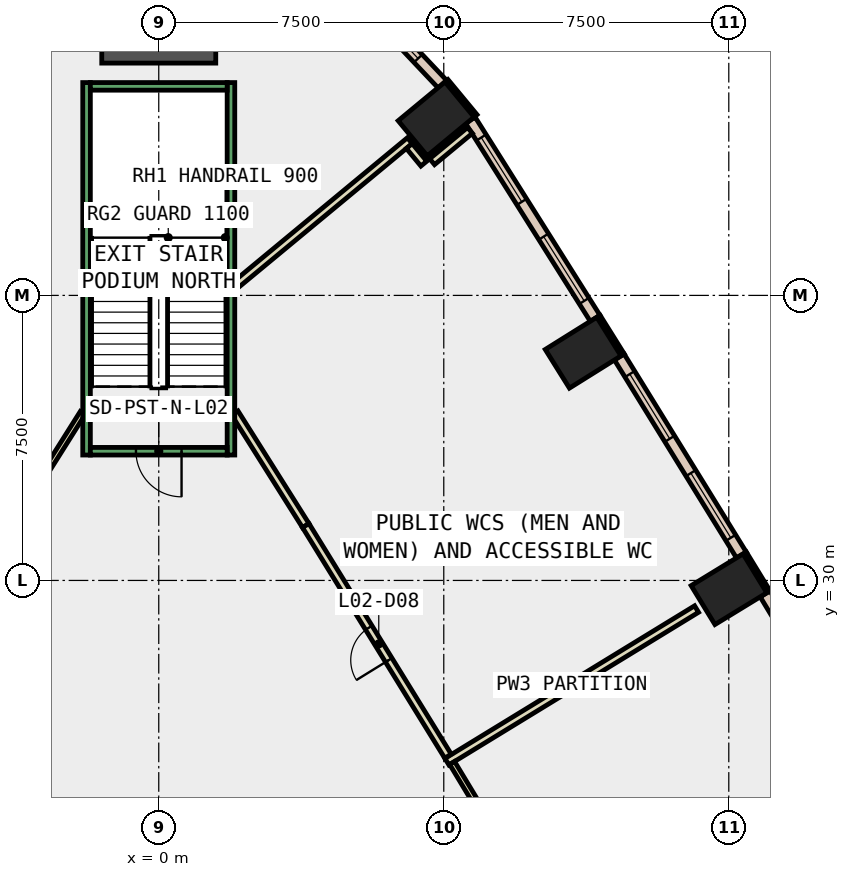
"""IFC4 building model, lengths in metres.
Left out: names, types, materials, properties, quantities, classifications, styles, units other than length and angle.
Written with IfcOpenShell. Run it as: python <this file> out.ifc"""

import sys

from ifc_helpers import new_model, si_unit, direction, frame, frame_2d, origin, origin_2d, place, context, subcontext, project, spatial, rectangle, extrude, element, fill, save


model = new_model("IFC4")
c1 = context("Model", 3, precision=1e-05, world=origin(), true_north=direction((0.0, 1.0)))
c2 = subcontext(c1, "Body", "Model", "MODEL_VIEW")
j1 = project(units=[si_unit("LENGTHUNIT", "METRE"), si_unit("PLANEANGLEUNIT", "RADIAN")], contexts=[c1])
p1 = place(None, origin())
s1 = spatial("IfcSite", under=j1, at=p1, CompositionType="ELEMENT")
p2 = place(p1, origin())
s2 = spatial("IfcBuilding", under=s1, at=p2, CompositionType="ELEMENT")
p3 = place(p2, frame((0.0, 0.0, 15.0)))
s3 = spatial("IfcBuildingStorey", under=s2, at=p3, CompositionType="ELEMENT", Elevation=15.0)
for number, where, z_axis, x_axis in (
    (1, (15.005, 29.769, -0.45), (0.0, 0.0, 1.0), (-0.522, 0.853, 0.0)),
    (2, (11.167, 35.993, -0.45), (0.0, 0.0, 1.0), (-0.53, 0.848, 0.0)),
    (3, (7.299, 42.144, -0.45), (0.0, 0.0, 1.0), (-0.638, 0.77, 0.0)),
):
    element("IfcColumn", number, at=place(p3, frame(where, z_axis=z_axis, x_axis=x_axis)), inside=s3, PredefinedType="COLUMN", context=c2, shape_type="SweptSolid", body=[
        extrude(rectangle(XDim=1.2, YDim=1.6, at=origin_2d()), origin(), (0.0, 0.0, 1.0), 5.0),
    ])
p4 = place(p3, frame((0.0, 45.112, -0.45), z_axis=(0.0, 0.0, 1.0), x_axis=(0.0, 1.0, 0.0)))
e4 = element("IfcColumn", 4, at=p4, inside=s3, PredefinedType="COLUMN", context=c2, shape_type="SweptSolid", body=[
    extrude(rectangle(XDim=3.0, YDim=3.0, at=origin_2d()), origin(), (0.0, 0.0, 1.0), 5.0),
])
p5 = place(p3, frame((16.043, 29.7, 0.0), z_axis=(0.0, 0.0, 1.0), x_axis=(-0.521507599072, 0.853246637327, 0.0)))
e5 = element("IfcWall", 5, at=p5, inside=s3, PredefinedType="STANDARD", context=c2, shape_type="SweptSolid", body=[
    extrude(rectangle(XDim=1.2, YDim=0.1, at=frame_2d((0.6, 0.0))), origin(), (0.0, 0.0, 1.0), 4.55),
])
for number, where, z_axis, x_axis in (
    (6, (12.206, 35.935, 0.0), (0.0, 0.0, 1.0), (-0.53, 0.848, 0.0)),
    (7, (8.336, 42.224, 0.0), (0.0, 0.0, 1.0), (-0.638, 0.77, 0.0)),
):
    element("IfcWall", number, at=place(p3, frame(where, z_axis=z_axis, x_axis=x_axis)), inside=s3, PredefinedType="STANDARD", context=c2, shape_type="SweptSolid", body=[
        extrude(rectangle(XDim=1.199, YDim=0.1, at=frame_2d((0.6, 0.0))), origin(), (0.0, 0.0, 1.0), 4.55),
    ])
p6 = place(p3, frame((19.117, 24.406, 0.0), z_axis=(0.0, 0.0, 1.0), x_axis=(-0.516687651362, 0.85617397235, 0.0)))
e8 = element("IfcWall", 8, at=p6, inside=s3, PredefinedType="STANDARD", context=c2, shape_type="SweptSolid", body=[
    extrude(rectangle(XDim=6.121, YDim=0.3, at=frame_2d((3.061, 0.0))), origin(), (0.0, 0.0, 1.0), 4.55),
])
p7 = place(p6, frame((0.53, 0.0, 1.0)))
e9 = element("IfcOpeningElement", 9, at=p7, cuts=e8, PredefinedType="OPENING", context=c2, shape_type="SweptSolid", body=[
    extrude(rectangle(XDim=2.0, YDim=3.2, at=frame_2d((1.0, 1.6))), frame((0.0, 0.16, 0.0), z_axis=(0.0, -1.0, 0.0), x_axis=(1.0, 0.0, 0.0)), (0.0, 0.0, 1.0), 0.32),
])
p8 = place(p6, frame((3.591, 0.0, 1.0)))
e10 = element("IfcOpeningElement", 10, at=p8, cuts=e8, PredefinedType="OPENING", context=c2, shape_type="SweptSolid", body=[
    extrude(rectangle(XDim=2.0, YDim=3.2, at=frame_2d((1.0, 1.6))), frame((0.0, 0.16, 0.0), z_axis=(0.0, -1.0, 0.0), x_axis=(1.0, 0.0, 0.0)), (0.0, 0.0, 1.0), 0.32),
])
p9 = place(p3, frame((15.331, 30.67, 0.0), z_axis=(0.0, 0.0, 1.0), x_axis=(-0.524953701886, 0.85113078365, 0.0)))
e11 = element("IfcWall", 11, at=p9, inside=s3, PredefinedType="STANDARD", context=c2, shape_type="SweptSolid", body=[
    extrude(rectangle(XDim=6.123, YDim=0.3, at=frame_2d((3.061, 0.0))), origin(), (0.0, 0.0, 1.0), 4.55),
])
p10 = place(p9, frame((0.531, 0.0, 1.0)))
e12 = element("IfcOpeningElement", 12, at=p10, cuts=e11, PredefinedType="OPENING", context=c2, shape_type="SweptSolid", body=[
    extrude(rectangle(XDim=2.0, YDim=3.2, at=frame_2d((1.0, 1.6))), frame((0.0, 0.16, 0.0), z_axis=(0.0, -1.0, 0.0), x_axis=(1.0, 0.0, 0.0)), (0.0, 0.0, 1.0), 0.32),
])
p11 = place(p9, frame((3.592, 0.0, 1.0)))
e13 = element("IfcOpeningElement", 13, at=p11, cuts=e11, PredefinedType="OPENING", context=c2, shape_type="SweptSolid", body=[
    extrude(rectangle(XDim=2.0, YDim=3.2, at=frame_2d((1.0, 1.6))), frame((0.0, 0.16, 0.0), z_axis=(0.0, -1.0, 0.0), x_axis=(1.0, 0.0, 0.0)), (0.0, 0.0, 1.0), 0.32),
])
p12 = place(p3, frame((11.483, 36.897, 0.0), z_axis=(0.0, 0.0, 1.0), x_axis=(-0.53304020879, 0.846089910006, 0.0)))
e14 = element("IfcWall", 14, at=p12, inside=s3, PredefinedType="STANDARD", context=c2, shape_type="SweptSolid", body=[
    extrude(rectangle(XDim=6.163, YDim=0.3, at=frame_2d((3.081, 0.0))), origin(), (0.0, 0.0, 1.0), 4.55),
])
p13 = place(p12, frame((0.541, 0.0, 1.0)))
e15 = element("IfcOpeningElement", 15, at=p13, cuts=e14, PredefinedType="OPENING", context=c2, shape_type="SweptSolid", body=[
    extrude(rectangle(XDim=2.0, YDim=3.2, at=frame_2d((1.0, 1.6))), frame((0.0, 0.16, 0.0), z_axis=(0.0, -1.0, 0.0), x_axis=(1.0, 0.0, 0.0)), (0.0, 0.0, 1.0), 0.32),
])
p14 = place(p12, frame((3.622, 0.0, 1.0)))
e16 = element("IfcOpeningElement", 16, at=p14, cuts=e14, PredefinedType="OPENING", context=c2, shape_type="SweptSolid", body=[
    extrude(rectangle(XDim=2.0, YDim=3.2, at=frame_2d((1.0, 1.6))), frame((0.0, 0.16, 0.0), z_axis=(0.0, -1.0, 0.0), x_axis=(1.0, 0.0, 0.0)), (0.0, 0.0, 1.0), 0.32),
])
p15 = place(p3, frame((7.464, 43.058, 0.0), z_axis=(0.0, 0.0, 1.0), x_axis=(-0.687081126245, 0.726580708495, 0.0)))
e17 = element("IfcWall", 17, at=p15, inside=s3, PredefinedType="STANDARD", context=c2, shape_type="SweptSolid", body=[
    extrude(rectangle(XDim=3.461, YDim=0.3, at=frame_2d((1.73, 0.0))), origin(), (0.0, 0.0, 1.0), 4.55),
])
p16 = place(p15, frame((0.931, 0.0, 1.0)))
e18 = element("IfcOpeningElement", 18, at=p16, cuts=e17, PredefinedType="OPENING", context=c2, shape_type="SweptSolid", body=[
    extrude(rectangle(XDim=1.6, YDim=3.2, at=frame_2d((0.8, 1.6))), frame((0.0, 0.16, 0.0), z_axis=(0.0, -1.0, 0.0), x_axis=(1.0, 0.0, 0.0)), (0.0, 0.0, 1.0), 0.32),
])
p17 = place(p3, frame((7.583, 25.231, 0.0), z_axis=(0.0, 0.0, 1.0), x_axis=(0.853185410435, 0.521607760124, 0.0)))
e19 = element("IfcWall", 19, at=p17, inside=s3, PredefinedType="PARTITIONING", context=c2, shape_type="SweptSolid", body=[
    extrude(rectangle(XDim=7.699, YDim=0.2, at=frame_2d((3.85, 0.0))), origin(), (0.0, 0.0, 1.0), 4.55),
])
p18 = place(p3, frame((11.397, 19.101, 0.0), z_axis=(0.0, 0.0, 1.0), x_axis=(-0.516501552057, 0.856286252793, 0.0)))
e20 = element("IfcWall", 20, at=p18, inside=s3, PredefinedType="PARTITIONING", context=c2, shape_type="SweptSolid", body=[
    extrude(rectangle(XDim=7.119, YDim=0.15, at=frame_2d((3.56, 0.0))), origin(), (0.0, 0.0, 1.0), 4.55),
])
p19 = place(p18, frame((0.1, 0.0, 0.0)))
e21 = element("IfcOpeningElement", 21, at=p19, cuts=e20, PredefinedType="OPENING", context=c2, shape_type="SweptSolid", body=[
    extrude(rectangle(XDim=1.8, YDim=2.1, at=frame_2d((0.9, 1.05))), frame((0.0, 0.085, 0.0), z_axis=(0.0, -1.0, 0.0), x_axis=(1.0, 0.0, 0.0)), (0.0, 0.0, 1.0), 0.17),
])
p20 = place(p3, frame((2.0, 37.758, 0.0), z_axis=(0.0, 0.0, 1.0), x_axis=(0.7702988792, 0.637683022122, 0.0)))
e22 = element("IfcWall", 22, at=p20, inside=s3, PredefinedType="PARTITIONING", context=c2, shape_type="SweptSolid", body=[
    extrude(rectangle(XDim=5.979, YDim=0.2, at=frame_2d((2.99, 0.0))), origin(), (0.0, 0.0, 1.0), 4.55),
])
p21 = place(p3, frame((6.593, 41.43, 0.0), z_axis=(0.0, 0.0, 1.0), x_axis=(0.636576557089, -0.771213515808, 0.0)))
e23 = element("IfcWall", 23, at=p21, inside=s3, PredefinedType="PARTITIONING", context=c2, shape_type="SweptSolid", body=[
    extrude(rectangle(XDim=0.6, YDim=0.2, at=frame_2d((0.3, 0.0))), origin(), (0.0, 0.0, 1.0), 4.55),
])
p22 = place(p3, frame((7.193, 41.018, 0.0), z_axis=(0.0, 0.0, 1.0), x_axis=(0.77046149962, 0.637486531311, 0.0)))
e24 = element("IfcWall", 24, at=p22, inside=s3, PredefinedType="PARTITIONING", context=c2, shape_type="SweptSolid", body=[
    extrude(rectangle(XDim=1.292, YDim=0.2, at=frame_2d((0.646, 0.0))), origin(), (0.0, 0.0, 1.0), 4.55),
])
p23 = place(p3, frame((3.868, 31.444, 0.0), z_axis=(0.0, 0.0, 1.0), x_axis=(-0.533177332948, 0.846003505684, 0.0)))
e25 = element("IfcWall", 25, at=p23, inside=s3, PredefinedType="PARTITIONING", context=c2, shape_type="SweptSolid", body=[
    extrude(rectangle(XDim=3.503, YDim=0.2, at=frame_2d((1.752, 0.0))), origin(), (0.0, 0.0, 1.0), 4.55),
])
p24 = place(p3, frame((7.611, 25.376, 0.0), z_axis=(0.0, 0.0, 1.0), x_axis=(-0.525006538042, 0.85109819352, 0.0)))
e26 = element("IfcWall", 26, at=p24, inside=s3, PredefinedType="PARTITIONING", context=c2, shape_type="SweptSolid", body=[
    extrude(rectangle(XDim=7.13, YDim=0.2, at=frame_2d((3.565, 0.0))), origin(), (0.0, 0.0, 1.0), 4.55),
])
p25 = place(p24, frame((2.97, 0.0, 0.0)))
e27 = element("IfcOpeningElement", 27, at=p25, cuts=e26, PredefinedType="OPENING", context=c2, shape_type="SweptSolid", body=[
    extrude(rectangle(XDim=1.0, YDim=2.1, at=frame_2d((0.5, 1.05))), frame((0.0, 0.11, 0.0), z_axis=(0.0, -1.0, 0.0), x_axis=(1.0, 0.0, 0.0)), (0.0, 0.0, 1.0), 0.22),
])
p26 = place(p3, frame((-2.0, 34.408, 0.0), z_axis=(0.0, 0.0, 1.0), x_axis=(-0.533177332948, -0.846003505684, 0.0)))
e28 = element("IfcWall", 28, at=p26, inside=s3, PredefinedType="PARTITIONING", context=c2, shape_type="SweptSolid", body=[
    extrude(rectangle(XDim=3.503, YDim=0.15, at=frame_2d((1.752, 0.0))), origin(), (0.0, 0.0, 1.0), 4.55),
])
for number, where, z_axis, x_axis in (
    (29, (1.9, 33.3, 0.0), (0.0, 0.0, 1.0), (0.0, 1.0, 0.0)),
    (30, (-1.9, 33.3, 0.0), (0.0, 0.0, 1.0), (0.0, 1.0, 0.0)),
):
    element("IfcWall", number, at=place(p3, frame(where, z_axis=z_axis, x_axis=x_axis)), inside=s3, PredefinedType="STANDARD", context=c2, shape_type="SweptSolid", body=[
        extrude(rectangle(XDim=9.8, YDim=0.2, at=frame_2d((4.9, 0.0))), origin(), (0.0, 0.0, 1.0), 4.55),
    ])
p27 = place(p3, frame((1.8, 33.4, 0.0), z_axis=(0.0, 0.0, 1.0), x_axis=(-1.0, 0.0, 0.0)))
e31 = element("IfcWall", 31, at=p27, inside=s3, PredefinedType="STANDARD", context=c2, shape_type="SweptSolid", body=[
    extrude(rectangle(XDim=3.6, YDim=0.2, at=frame_2d((1.8, 0.0))), origin(), (0.0, 0.0, 1.0), 4.55),
])
p28 = place(p27, frame((1.2, 0.0, 0.0)))
e32 = element("IfcOpeningElement", 32, at=p28, cuts=e31, PredefinedType="OPENING", context=c2, shape_type="SweptSolid", body=[
    extrude(rectangle(XDim=1.2, YDim=2.2, at=frame_2d((0.6, 1.1))), frame((0.0, 0.11, 0.0), z_axis=(0.0, -1.0, 0.0), x_axis=(1.0, 0.0, 0.0)), (0.0, 0.0, 1.0), 0.22),
])
p29 = place(p3, frame((1.8, 43.0, 0.0), z_axis=(0.0, 0.0, 1.0), x_axis=(-1.0, 0.0, 0.0)))
e33 = element("IfcWall", 33, at=p29, inside=s3, PredefinedType="STANDARD", context=c2, shape_type="SweptSolid", body=[
    extrude(rectangle(XDim=3.6, YDim=0.2, at=frame_2d((1.8, 0.0))), origin(), (0.0, 0.0, 1.0), 4.55),
])
p30 = place(p10, origin())
e34 = element("IfcWindow", 34, at=p30, inside=s3, PartitioningType="SINGLE_PANEL", PredefinedType="WINDOW", context=c2, shape_type="SweptSolid", body=[
    extrude(rectangle(XDim=2.0, YDim=3.2, at=frame_2d((1.0, 1.6))), frame((0.0, 0.03, 0.0), z_axis=(0.0, -1.0, 0.0), x_axis=(1.0, 0.0, 0.0)), (0.0, 0.0, 1.0), 0.06),
])
fill(e12, e34)
p31 = place(p11, origin())
e35 = element("IfcWindow", 35, at=p31, inside=s3, PartitioningType="SINGLE_PANEL", PredefinedType="WINDOW", context=c2, shape_type="SweptSolid", body=[
    extrude(rectangle(XDim=2.0, YDim=3.2, at=frame_2d((1.0, 1.6))), frame((0.0, 0.03, 0.0), z_axis=(0.0, -1.0, 0.0), x_axis=(1.0, 0.0, 0.0)), (0.0, 0.0, 1.0), 0.06),
])
fill(e13, e35)
p32 = place(p13, origin())
e36 = element("IfcWindow", 36, at=p32, inside=s3, PartitioningType="SINGLE_PANEL", PredefinedType="WINDOW", context=c2, shape_type="SweptSolid", body=[
    extrude(rectangle(XDim=2.0, YDim=3.2, at=frame_2d((1.0, 1.6))), frame((0.0, 0.03, 0.0), z_axis=(0.0, -1.0, 0.0), x_axis=(1.0, 0.0, 0.0)), (0.0, 0.0, 1.0), 0.06),
])
fill(e15, e36)
p33 = place(p14, origin())
e37 = element("IfcWindow", 37, at=p33, inside=s3, PartitioningType="SINGLE_PANEL", PredefinedType="WINDOW", context=c2, shape_type="SweptSolid", body=[
    extrude(rectangle(XDim=2.0, YDim=3.2, at=frame_2d((1.0, 1.6))), frame((0.0, 0.03, 0.0), z_axis=(0.0, -1.0, 0.0), x_axis=(1.0, 0.0, 0.0)), (0.0, 0.0, 1.0), 0.06),
])
fill(e16, e37)
p34 = place(p16, origin())
e38 = element("IfcWindow", 38, at=p34, inside=s3, PartitioningType="SINGLE_PANEL", PredefinedType="WINDOW", context=c2, shape_type="SweptSolid", body=[
    extrude(rectangle(XDim=1.6, YDim=3.2, at=frame_2d((0.8, 1.6))), frame((0.0, 0.03, 0.0), z_axis=(0.0, -1.0, 0.0), x_axis=(1.0, 0.0, 0.0)), (0.0, 0.0, 1.0), 0.06),
])
fill(e18, e38)
p35 = place(p25, origin())
e39 = element("IfcDoor", 39, at=p35, inside=s3, OperationType="SINGLE_SWING_LEFT", PredefinedType="DOOR", context=c2, shape_type="SweptSolid", body=[
    extrude(rectangle(XDim=1.0, YDim=2.1, at=frame_2d((0.5, 1.05))), frame((0.0, 0.025, 0.0), z_axis=(0.0, -1.0, 0.0), x_axis=(1.0, 0.0, 0.0)), (0.0, 0.0, 1.0), 0.05),
])
fill(e27, e39)
p36 = place(p28, origin())
e40 = element("IfcDoor", 40, at=p36, inside=s3, OperationType="SINGLE_SWING_LEFT", PredefinedType="DOOR", context=c2, shape_type="SweptSolid", body=[
    extrude(rectangle(XDim=1.2, YDim=2.2, at=frame_2d((0.6, 1.1))), frame((0.0, 0.025, 0.0), z_axis=(0.0, -1.0, 0.0), x_axis=(1.0, 0.0, 0.0)), (0.0, 0.0, 1.0), 0.05),
])
fill(e32, e40)
save(model, sys.argv[1])
